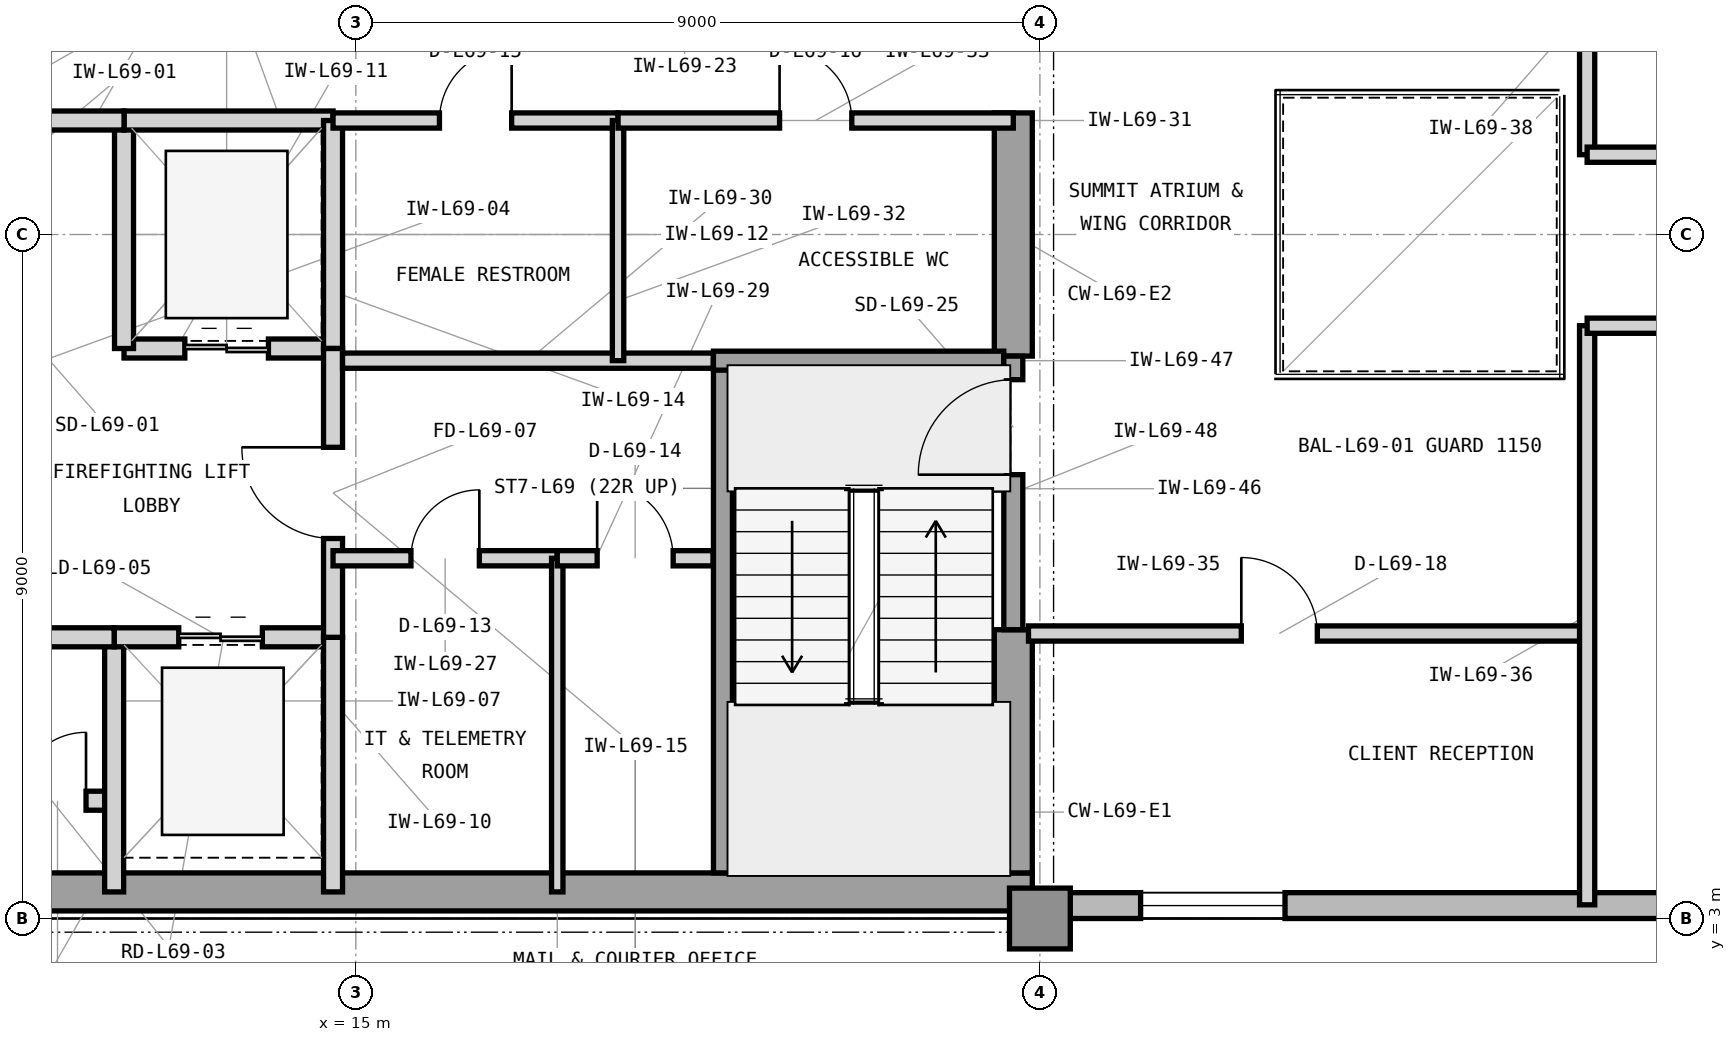
"""IFC4 building model, lengths in metres.
Left out: names, types, materials, properties, quantities, classifications, styles, units other than length and angle.
Written with IfcOpenShell. Run it as: python <this file> out.ifc"""

import sys

from ifc_helpers import new_model, si_unit, direction, frame, frame_2d, origin, origin_2d, place, context, subcontext, project, spatial, rectangle, extrude, element, fill, save


model = new_model("IFC4")
c1 = context("Model", 3, precision=1e-05, world=origin(), true_north=direction((0.0, 1.0)))
c2 = subcontext(c1, "Body", "Model", "MODEL_VIEW")
j1 = project(units=[si_unit("LENGTHUNIT", "METRE"), si_unit("PLANEANGLEUNIT", "RADIAN")], contexts=[c1])
p1 = place(None, origin())
s1 = spatial("IfcSite", under=j1, at=p1, CompositionType="ELEMENT")
p2 = place(p1, origin())
s2 = spatial("IfcBuilding", under=s1, at=p2, CompositionType="ELEMENT")
p3 = place(p2, frame((0.0, 0.0, 282.0)))
s3 = spatial("IfcBuildingStorey", under=s2, at=p3, CompositionType="ELEMENT", Elevation=282.0)
p4 = place(p3, frame((7.475, 3.35, 0.0), z_axis=(0.0, 0.0, 1.0), x_axis=(1.0, 0.0, 0.0)))
e1 = element("IfcWall", 1, at=p4, inside=s3, PredefinedType="SHEAR", context=c2, shape_type="SweptSolid", body=[
    extrude(rectangle(XDim=16.425, YDim=0.5, at=frame_2d((8.212, 0.0))), origin(), (0.0, 0.0, 1.0), 3.9),
])
p5 = place(p3, frame((23.65, 3.6, 0.0), z_axis=(0.0, 0.0, 1.0), x_axis=(0.0, 1.0, 0.0)))
e2 = element("IfcWall", 2, at=p5, inside=s3, PredefinedType="SHEAR", context=c2, shape_type="SweptSolid", body=[
    extrude(rectangle(XDim=3.2, YDim=0.5, at=frame_2d((1.6, 0.0))), origin(), (0.0, 0.0, 1.0), 3.9),
])
p6 = place(p3, frame((23.65, 10.4, 0.0), z_axis=(0.0, 0.0, 1.0), x_axis=(0.0, 1.0, 0.0)))
e3 = element("IfcWall", 3, at=p6, inside=s3, PredefinedType="SHEAR", context=c2, shape_type="SweptSolid", body=[
    extrude(rectangle(XDim=3.2, YDim=0.5, at=frame_2d((1.6, 0.0))), origin(), (0.0, 0.0, 1.0), 3.9),
])
p7 = place(p3, frame((24.0, 3.0, 0.0), z_axis=(0.0, 0.0, 1.0), x_axis=(1.0, 0.0, 0.0)))
e4 = element("IfcColumn", 4, at=p7, inside=s3, PredefinedType="COLUMN", context=c2, shape_type="SweptSolid", body=[
    extrude(rectangle(XDim=0.8, YDim=0.8, at=origin_2d()), origin(), (0.0, 0.0, 1.0), 3.9),
])
p8 = place(p3, frame((23.9, 3.17, 0.0), z_axis=(0.0, 0.0, 1.0), x_axis=(1.0, 0.0, 0.0)))
e5 = element("IfcWall", 5, at=p8, inside=s3, PredefinedType="STANDARD", context=c2, shape_type="SweptSolid", body=[
    extrude(rectangle(XDim=28.5, YDim=0.34, at=frame_2d((14.25, 0.0))), origin(), (0.0, 0.0, 1.0), 3.715),
])
p9 = place(p8, frame((1.425, 0.0, 0.8)))
e6 = element("IfcOpeningElement", 6, at=p9, cuts=e5, PredefinedType="OPENING", context=c2, shape_type="SweptSolid", body=[
    extrude(rectangle(XDim=1.9, YDim=2.35, at=frame_2d((0.95, 1.175))), frame((0.0, 0.18, 0.0), z_axis=(0.0, -1.0, 0.0), x_axis=(1.0, 0.0, 0.0)), (0.0, 0.0, 1.0), 0.36),
])
p10 = place(p8, frame((10.575, 0.0, 0.8)))
e7 = element("IfcOpeningElement", 7, at=p10, cuts=e5, PredefinedType="OPENING", context=c2, shape_type="SweptSolid", body=[
    extrude(rectangle(XDim=2.6, YDim=2.35, at=frame_2d((1.3, 1.175))), frame((0.0, 0.18, 0.0), z_axis=(0.0, -1.0, 0.0), x_axis=(1.0, 0.0, 0.0)), (0.0, 0.0, 1.0), 0.36),
])
p11 = place(p8, frame((20.075, 0.0, 0.8)))
e8 = element("IfcOpeningElement", 8, at=p11, cuts=e5, PredefinedType="OPENING", context=c2, shape_type="SweptSolid", body=[
    extrude(rectangle(XDim=2.6, YDim=2.35, at=frame_2d((1.3, 1.175))), frame((0.0, 0.18, 0.0), z_axis=(0.0, -1.0, 0.0), x_axis=(1.0, 0.0, 0.0)), (0.0, 0.0, 1.0), 0.36),
])
p12 = place(p3, frame((10.33, 4.55, 0.0), z_axis=(0.0, 0.0, 1.0), x_axis=(1.0, 0.0, 0.0)))
e9 = element("IfcWall", 9, at=p12, inside=s3, PredefinedType="PARTITIONING", context=c2, shape_type="SweptSolid", body=[
    extrude(rectangle(XDim=1.49, YDim=0.25, at=frame_2d((0.745, 0.0))), origin(), (0.0, 0.0, 1.0), 3.63),
])
p13 = place(p12, frame((0.22, 0.0, 0.0)))
e10 = element("IfcOpeningElement", 10, at=p13, cuts=e9, PredefinedType="OPENING", context=c2, shape_type="SweptSolid", body=[
    extrude(rectangle(XDim=0.9, YDim=2.1, at=frame_2d((0.45, 1.05))), frame((0.0, 0.135, 0.0), z_axis=(0.0, -1.0, 0.0), x_axis=(1.0, 0.0, 0.0)), (0.0, 0.0, 1.0), 0.27),
])
p14 = place(p3, frame((11.82, 3.35, 0.0), z_axis=(0.0, 0.0, 1.0), x_axis=(0.0, 1.0, 0.0)))
e11 = element("IfcWall", 11, at=p14, inside=s3, PredefinedType="PARTITIONING", context=c2, shape_type="SweptSolid", body=[
    extrude(rectangle(XDim=3.35, YDim=0.25, at=frame_2d((1.675, 0.0))), origin(), (0.0, 0.0, 1.0), 3.63),
])
p15 = place(p3, frame((11.82, 6.7, 0.0), z_axis=(0.0, 0.0, 1.0), x_axis=(1.0, 0.0, 0.0)))
e12 = element("IfcWall", 12, at=p15, inside=s3, PredefinedType="PARTITIONING", context=c2, shape_type="SweptSolid", body=[
    extrude(rectangle(XDim=2.88, YDim=0.25, at=frame_2d((1.44, 0.0))), origin(), (0.0, 0.0, 1.0), 3.354),
])
p16 = place(p15, frame((0.85, 0.0, 0.0)))
e13 = element("IfcOpeningElement", 13, at=p16, cuts=e12, PredefinedType="OPENING", context=c2, shape_type="SweptSolid", body=[
    extrude(rectangle(XDim=1.1, YDim=2.25, at=frame_2d((0.55, 1.125))), frame((0.0, 0.135, 0.0), z_axis=(0.0, -1.0, 0.0), x_axis=(1.0, 0.0, 0.0)), (0.0, 0.0, 1.0), 0.27),
])
p17 = place(p3, frame((14.7, 3.35, 0.0), z_axis=(0.0, 0.0, 1.0), x_axis=(0.0, 1.0, 0.0)))
e14 = element("IfcWall", 14, at=p17, inside=s3, PredefinedType="PARTITIONING", context=c2, shape_type="SweptSolid", body=[
    extrude(rectangle(XDim=3.35, YDim=0.25, at=frame_2d((1.675, 0.0))), origin(), (0.0, 0.0, 1.0), 3.63),
])
p18 = place(p3, frame((11.95, 10.5, 0.0), z_axis=(0.0, 0.0, 1.0), x_axis=(1.0, 0.0, 0.0)))
e15 = element("IfcWall", 15, at=p18, inside=s3, PredefinedType="PARTITIONING", context=c2, shape_type="SweptSolid", body=[
    extrude(rectangle(XDim=2.75, YDim=0.25, at=frame_2d((1.375, 0.0))), origin(), (0.0, 0.0, 1.0), 3.354),
])
p19 = place(p18, frame((0.8, 0.0, 0.0)))
e16 = element("IfcOpeningElement", 16, at=p19, cuts=e15, PredefinedType="OPENING", context=c2, shape_type="SweptSolid", body=[
    extrude(rectangle(XDim=1.1, YDim=2.25, at=frame_2d((0.55, 1.125))), frame((0.0, 0.135, 0.0), z_axis=(0.0, -1.0, 0.0), x_axis=(1.0, 0.0, 0.0)), (0.0, 0.0, 1.0), 0.27),
])
p20 = place(p3, frame((11.95, 10.5, 0.0), z_axis=(0.0, 0.0, 1.0), x_axis=(0.0, 1.0, 0.0)))
e17 = element("IfcWall", 17, at=p20, inside=s3, PredefinedType="PARTITIONING", context=c2, shape_type="SweptSolid", body=[
    extrude(rectangle(XDim=3.0, YDim=0.25, at=frame_2d((1.5, 0.0))), origin(), (0.0, 0.0, 1.0), 3.63),
])
p21 = place(p3, frame((11.95, 13.5, 0.0), z_axis=(0.0, 0.0, 1.0), x_axis=(1.0, 0.0, 0.0)))
e18 = element("IfcWall", 18, at=p21, inside=s3, PredefinedType="PARTITIONING", context=c2, shape_type="SweptSolid", body=[
    extrude(rectangle(XDim=2.75, YDim=0.25, at=frame_2d((1.375, 0.0))), origin(), (0.0, 0.0, 1.0), 3.354),
])
p22 = place(p3, frame((14.7, 10.5, 0.0), z_axis=(0.0, 0.0, 1.0), x_axis=(0.0, 1.0, 0.0)))
e19 = element("IfcWall", 19, at=p22, inside=s3, PredefinedType="PARTITIONING", context=c2, shape_type="SweptSolid", body=[
    extrude(rectangle(XDim=3.0, YDim=0.25, at=frame_2d((1.5, 0.0))), origin(), (0.0, 0.0, 1.0), 3.63),
])
p23 = place(p3, frame((14.7, 6.7, 0.0), z_axis=(0.0, 0.0, 1.0), x_axis=(0.0, 1.0, 0.0)))
e20 = element("IfcWall", 20, at=p23, inside=s3, PredefinedType="PARTITIONING", context=c2, shape_type="SweptSolid", body=[
    extrude(rectangle(XDim=3.8, YDim=0.25, at=frame_2d((1.9, 0.0))), origin(), (0.0, 0.0, 1.0), 3.63),
])
p24 = place(p23, frame((1.3, 0.0, 0.0)))
e21 = element("IfcOpeningElement", 21, at=p24, cuts=e20, PredefinedType="OPENING", context=c2, shape_type="SweptSolid", body=[
    extrude(rectangle(XDim=1.2, YDim=2.2, at=frame_2d((0.6, 1.1))), frame((0.0, 0.135, 0.0), z_axis=(0.0, -1.0, 0.0), x_axis=(1.0, 0.0, 0.0)), (0.0, 0.0, 1.0), 0.27),
])
p25 = place(p3, frame((10.33, 13.5, 0.0), z_axis=(0.0, 0.0, 1.0), x_axis=(1.0, 0.0, 0.0)))
e22 = element("IfcWall", 22, at=p25, inside=s3, PredefinedType="PARTITIONING", context=c2, shape_type="SweptSolid", body=[
    extrude(rectangle(XDim=1.62, YDim=0.25, at=frame_2d((0.81, 0.0))), origin(), (0.0, 0.0, 1.0), 3.354),
])
p26 = place(p3, frame((10.33, 6.7, 0.0), z_axis=(0.0, 0.0, 1.0), x_axis=(1.0, 0.0, 0.0)))
e23 = element("IfcWall", 23, at=p26, inside=s3, PredefinedType="PARTITIONING", context=c2, shape_type="SweptSolid", body=[
    extrude(rectangle(XDim=1.49, YDim=0.25, at=frame_2d((0.745, 0.0))), origin(), (0.0, 0.0, 1.0), 3.354),
])
p27 = place(p3, frame((14.7, 7.74, 0.0), z_axis=(0.0, 0.0, 1.0), x_axis=(1.0, 0.0, 0.0)))
e24 = element("IfcWall", 24, at=p27, inside=s3, PredefinedType="PARTITIONING", context=c2, shape_type="SweptSolid", body=[
    extrude(rectangle(XDim=2.95, YDim=0.2, at=frame_2d((1.475, 0.0))), origin(), (0.0, 0.0, 1.0), 3.63),
])
p28 = place(p27, frame((1.025, 0.0, 0.0)))
e25 = element("IfcOpeningElement", 25, at=p28, cuts=e24, PredefinedType="OPENING", context=c2, shape_type="SweptSolid", body=[
    extrude(rectangle(XDim=0.9, YDim=2.1, at=frame_2d((0.45, 1.05))), frame((0.0, 0.11, 0.0), z_axis=(0.0, -1.0, 0.0), x_axis=(1.0, 0.0, 0.0)), (0.0, 0.0, 1.0), 0.22),
])
p29 = place(p3, frame((17.65, 3.35, 0.0), z_axis=(0.0, 0.0, 1.0), x_axis=(0.0, 1.0, 0.0)))
e26 = element("IfcWall", 26, at=p29, inside=s3, PredefinedType="PARTITIONING", context=c2, shape_type="SweptSolid", body=[
    extrude(rectangle(XDim=4.39, YDim=0.15, at=frame_2d((2.195, 0.0))), origin(), (0.0, 0.0, 1.0), 3.63),
])
p30 = place(p3, frame((17.65, 7.74, 0.0), z_axis=(0.0, 0.0, 1.0), x_axis=(1.0, 0.0, 0.0)))
e27 = element("IfcWall", 27, at=p30, inside=s3, PredefinedType="PARTITIONING", context=c2, shape_type="SweptSolid", body=[
    extrude(rectangle(XDim=2.05, YDim=0.2, at=frame_2d((1.025, 0.0))), origin(), (0.0, 0.0, 1.0), 3.63),
])
p31 = place(p30, frame((0.525, 0.0, 0.0)))
e28 = element("IfcOpeningElement", 28, at=p31, cuts=e27, PredefinedType="OPENING", context=c2, shape_type="SweptSolid", body=[
    extrude(rectangle(XDim=1.0, YDim=2.15, at=frame_2d((0.5, 1.075))), frame((0.0, 0.11, 0.0), z_axis=(0.0, -1.0, 0.0), x_axis=(1.0, 0.0, 0.0)), (0.0, 0.0, 1.0), 0.22),
])
p32 = place(p3, frame((14.825, 10.34, 0.0), z_axis=(0.0, 0.0, 1.0), x_axis=(1.0, 0.0, 0.0)))
e29 = element("IfcWall", 29, at=p32, inside=s3, PredefinedType="PARTITIONING", context=c2, shape_type="SweptSolid", body=[
    extrude(rectangle(XDim=4.88, YDim=0.2, at=frame_2d((2.44, 0.0))), origin(), (0.0, 0.0, 1.0), 3.63),
])
p33 = place(p3, frame((14.7, 13.5, 0.0), z_axis=(0.0, 0.0, 1.0), x_axis=(1.0, 0.0, 0.0)))
e30 = element("IfcWall", 30, at=p33, inside=s3, PredefinedType="PARTITIONING", context=c2, shape_type="SweptSolid", body=[
    extrude(rectangle(XDim=3.75, YDim=0.2, at=frame_2d((1.875, 0.0))), origin(), (0.0, 0.0, 1.0), 3.354),
])
p34 = place(p33, frame((1.4, 0.0, 0.0)))
e31 = element("IfcOpeningElement", 31, at=p34, cuts=e30, PredefinedType="OPENING", context=c2, shape_type="SweptSolid", body=[
    extrude(rectangle(XDim=0.95, YDim=2.1, at=frame_2d((0.475, 1.05))), frame((0.0, 0.11, 0.0), z_axis=(0.0, -1.0, 0.0), x_axis=(1.0, 0.0, 0.0)), (0.0, 0.0, 1.0), 0.22),
])
p35 = place(p3, frame((18.45, 10.34, 0.0), z_axis=(0.0, 0.0, 1.0), x_axis=(0.0, 1.0, 0.0)))
e32 = element("IfcWall", 32, at=p35, inside=s3, PredefinedType="PARTITIONING", context=c2, shape_type="SweptSolid", body=[
    extrude(rectangle(XDim=3.16, YDim=0.15, at=frame_2d((1.58, 0.0))), origin(), (0.0, 0.0, 1.0), 3.63),
])
p36 = place(p3, frame((18.45, 13.5, 0.0), z_axis=(0.0, 0.0, 1.0), x_axis=(1.0, 0.0, 0.0)))
e33 = element("IfcWall", 33, at=p36, inside=s3, PredefinedType="PARTITIONING", context=c2, shape_type="SweptSolid", body=[
    extrude(rectangle(XDim=5.2, YDim=0.2, at=frame_2d((2.6, 0.0))), origin(), (0.0, 0.0, 1.0), 3.354),
])
p37 = place(p36, frame((2.125, 0.0, 0.0)))
e34 = element("IfcOpeningElement", 34, at=p37, cuts=e33, PredefinedType="OPENING", context=c2, shape_type="SweptSolid", body=[
    extrude(rectangle(XDim=0.95, YDim=2.1, at=frame_2d((0.475, 1.05))), frame((0.0, 0.11, 0.0), z_axis=(0.0, -1.0, 0.0), x_axis=(1.0, 0.0, 0.0)), (0.0, 0.0, 1.0), 0.22),
])
p38 = place(p3, frame((23.85, 6.75, 0.0), z_axis=(0.0, 0.0, 1.0), x_axis=(1.0, 0.0, 0.0)))
e35 = element("IfcWall", 35, at=p38, inside=s3, PredefinedType="PARTITIONING", context=c2, shape_type="SweptSolid", body=[
    extrude(rectangle(XDim=7.35, YDim=0.2, at=frame_2d((3.675, 0.0))), origin(), (0.0, 0.0, 1.0), 3.63),
])
p39 = place(p38, frame((2.8, 0.0, 0.0)))
e36 = element("IfcOpeningElement", 36, at=p39, cuts=e35, PredefinedType="OPENING", context=c2, shape_type="SweptSolid", body=[
    extrude(rectangle(XDim=1.0, YDim=2.15, at=frame_2d((0.5, 1.075))), frame((0.0, 0.11, 0.0), z_axis=(0.0, -1.0, 0.0), x_axis=(1.0, 0.0, 0.0)), (0.0, 0.0, 1.0), 0.22),
])
p40 = place(p3, frame((31.2, 3.18, 0.0), z_axis=(0.0, 0.0, 1.0), x_axis=(0.0, 1.0, 0.0)))
e37 = element("IfcWall", 37, at=p40, inside=s3, PredefinedType="PARTITIONING", context=c2, shape_type="SweptSolid", body=[
    extrude(rectangle(XDim=7.62, YDim=0.2, at=frame_2d((3.81, 0.0))), origin(), (0.0, 0.0, 1.0), 3.63),
])
p41 = place(p3, frame((31.2, 13.05, 0.0), z_axis=(0.0, 0.0, 1.0), x_axis=(0.0, 1.0, 0.0)))
e38 = element("IfcWall", 38, at=p41, inside=s3, PredefinedType="PARTITIONING", context=c2, shape_type="SweptSolid", body=[
    extrude(rectangle(XDim=7.77, YDim=0.2, at=frame_2d((3.885, 0.0))), origin(), (0.0, 0.0, 1.0), 3.63),
])
p42 = place(p3, frame((31.2, 10.8, 0.0), z_axis=(0.0, 0.0, 1.0), x_axis=(1.0, 0.0, 0.0)))
e39 = element("IfcWall", 39, at=p42, inside=s3, PredefinedType="PARTITIONING", context=c2, shape_type="SweptSolid", body=[
    extrude(rectangle(XDim=7.5, YDim=0.2, at=frame_2d((3.75, 0.0))), origin(), (0.0, 0.0, 1.0), 3.63),
])
p43 = place(p42, frame((3.25, 0.0, 0.0)))
e40 = element("IfcOpeningElement", 40, at=p43, cuts=e39, PredefinedType="OPENING", context=c2, shape_type="SweptSolid", body=[
    extrude(rectangle(XDim=1.0, YDim=2.15, at=frame_2d((0.5, 1.075))), frame((0.0, 0.11, 0.0), z_axis=(0.0, -1.0, 0.0), x_axis=(1.0, 0.0, 0.0)), (0.0, 0.0, 1.0), 0.22),
])
p44 = place(p3, frame((31.2, 13.05, 0.0), z_axis=(0.0, 0.0, 1.0), x_axis=(1.0, 0.0, 0.0)))
e41 = element("IfcWall", 41, at=p44, inside=s3, PredefinedType="PARTITIONING", context=c2, shape_type="SweptSolid", body=[
    extrude(rectangle(XDim=9.5, YDim=0.2, at=frame_2d((4.75, 0.0))), origin(), (0.0, 0.0, 1.0), 3.63),
])
p45 = place(p44, frame((4.25, 0.0, 0.0)))
e42 = element("IfcOpeningElement", 42, at=p45, cuts=e41, PredefinedType="OPENING", context=c2, shape_type="SweptSolid", body=[
    extrude(rectangle(XDim=1.0, YDim=2.15, at=frame_2d((0.5, 1.075))), frame((0.0, 0.11, 0.0), z_axis=(0.0, -1.0, 0.0), x_axis=(1.0, 0.0, 0.0)), (0.0, 0.0, 1.0), 0.22),
])
p46 = place(p3, frame((19.83, 3.6, 0.0), z_axis=(0.0, 0.0, 1.0), x_axis=(0.0, 1.0, 0.0)))
e43 = element("IfcWall", 43, at=p46, inside=s3, PredefinedType="SHEAR", context=c2, shape_type="SweptSolid", body=[
    extrude(rectangle(XDim=6.74, YDim=0.25, at=frame_2d((3.37, 0.0))), origin(), (0.0, 0.0, 1.0), 3.9),
])
p47 = place(p3, frame((19.705, 10.34, 0.0), z_axis=(0.0, 0.0, 1.0), x_axis=(1.0, 0.0, 0.0)))
e44 = element("IfcWall", 44, at=p47, inside=s3, PredefinedType="SHEAR", context=c2, shape_type="SweptSolid", body=[
    extrude(rectangle(XDim=3.82, YDim=0.25, at=frame_2d((1.91, 0.0))), origin(), (0.0, 0.0, 1.0), 3.9),
])
p48 = place(p3, frame((23.65, 6.8, 0.0), z_axis=(0.0, 0.0, 1.0), x_axis=(0.0, 1.0, 0.0)))
e45 = element("IfcWall", 45, at=p48, inside=s3, PredefinedType="SHEAR", context=c2, shape_type="SweptSolid", body=[
    extrude(rectangle(XDim=3.6, YDim=0.25, at=frame_2d((1.8, 0.0))), origin(), (0.0, 0.0, 1.0), 3.9),
])
p49 = place(p48, frame((2.04, 0.0, 0.0)))
e46 = element("IfcOpeningElement", 46, at=p49, cuts=e45, PredefinedType="OPENING", context=c2, shape_type="SweptSolid", body=[
    extrude(rectangle(XDim=1.25, YDim=2.2, at=frame_2d((0.625, 1.1))), frame((0.0, 0.135, 0.0), z_axis=(0.0, -1.0, 0.0), x_axis=(1.0, 0.0, 0.0)), (0.0, 0.0, 1.0), 0.27),
])
p50 = place(p9, origin())
e47 = element("IfcWindow", 47, at=p50, inside=s3, PartitioningType="SINGLE_PANEL", PredefinedType="WINDOW", context=c2, shape_type="SweptSolid", body=[
    extrude(rectangle(XDim=1.9, YDim=2.35, at=frame_2d((0.95, 1.175))), frame((0.0, 0.11, 0.0), z_axis=(0.0, -1.0, 0.0), x_axis=(1.0, 0.0, 0.0)), (0.0, 0.0, 1.0), 0.06),
])
fill(e6, e47)
p51 = place(p13, origin())
e48 = element("IfcDoor", 48, at=p51, inside=s3, OperationType="SINGLE_SWING_RIGHT", PredefinedType="TRAPDOOR", context=c2, shape_type="SweptSolid", body=[
    extrude(rectangle(XDim=0.9, YDim=2.1, at=frame_2d((0.45, 1.05))), frame((0.0, 0.025, 0.0), z_axis=(0.0, -1.0, 0.0), x_axis=(1.0, 0.0, 0.0)), (0.0, 0.0, 1.0), 0.05),
])
fill(e10, e48)
p52 = place(p16, origin())
e49 = element("IfcDoor", 49, at=p52, inside=s3, OperationType="DOUBLE_DOOR_SLIDING", PredefinedType="DOOR", context=c2, shape_type="SweptSolid", body=[
    extrude(rectangle(XDim=1.1, YDim=2.25, at=frame_2d((0.55, 1.125))), frame((0.0, 0.025, 0.0), z_axis=(0.0, -1.0, 0.0), x_axis=(1.0, 0.0, 0.0)), (0.0, 0.0, 1.0), 0.05),
])
fill(e13, e49)
p53 = place(p19, origin())
e50 = element("IfcDoor", 50, at=p53, inside=s3, OperationType="DOUBLE_DOOR_SLIDING", PredefinedType="DOOR", context=c2, shape_type="SweptSolid", body=[
    extrude(rectangle(XDim=1.1, YDim=2.25, at=frame_2d((0.55, 1.125))), frame((0.0, 0.025, 0.0), z_axis=(0.0, -1.0, 0.0), x_axis=(1.0, 0.0, 0.0)), (0.0, 0.0, 1.0), 0.05),
])
fill(e16, e50)
p54 = place(p24, origin())
e51 = element("IfcDoor", 51, at=p54, inside=s3, OperationType="SINGLE_SWING_RIGHT", PredefinedType="DOOR", context=c2, shape_type="SweptSolid", body=[
    extrude(rectangle(XDim=1.2, YDim=2.2, at=frame_2d((0.6, 1.1))), frame((0.0, 0.025, 0.0), z_axis=(0.0, -1.0, 0.0), x_axis=(1.0, 0.0, 0.0)), (0.0, 0.0, 1.0), 0.05),
])
fill(e21, e51)
p55 = place(p28, origin())
e52 = element("IfcDoor", 52, at=p55, inside=s3, OperationType="SINGLE_SWING_RIGHT", PredefinedType="TRAPDOOR", context=c2, shape_type="SweptSolid", body=[
    extrude(rectangle(XDim=0.9, YDim=2.1, at=frame_2d((0.45, 1.05))), frame((0.0, 0.025, 0.0), z_axis=(0.0, -1.0, 0.0), x_axis=(1.0, 0.0, 0.0)), (0.0, 0.0, 1.0), 0.05),
])
fill(e25, e52)
p56 = place(p31, origin())
e53 = element("IfcDoor", 53, at=p56, inside=s3, OperationType="SINGLE_SWING_LEFT", PredefinedType="DOOR", context=c2, shape_type="SweptSolid", body=[
    extrude(rectangle(XDim=1.0, YDim=2.15, at=frame_2d((0.5, 1.075))), frame((0.0, 0.025, 0.0), z_axis=(0.0, -1.0, 0.0), x_axis=(1.0, 0.0, 0.0)), (0.0, 0.0, 1.0), 0.05),
])
fill(e28, e53)
p57 = place(p34, origin())
e54 = element("IfcDoor", 54, at=p57, inside=s3, OperationType="SINGLE_SWING_RIGHT", PredefinedType="DOOR", context=c2, shape_type="SweptSolid", body=[
    extrude(rectangle(XDim=0.95, YDim=2.1, at=frame_2d((0.475, 1.05))), frame((0.0, 0.025, 0.0), z_axis=(0.0, -1.0, 0.0), x_axis=(1.0, 0.0, 0.0)), (0.0, 0.0, 1.0), 0.05),
])
fill(e31, e54)
p58 = place(p37, origin())
e55 = element("IfcDoor", 55, at=p58, inside=s3, OperationType="SINGLE_SWING_LEFT", PredefinedType="DOOR", context=c2, shape_type="SweptSolid", body=[
    extrude(rectangle(XDim=0.95, YDim=2.1, at=frame_2d((0.475, 1.05))), frame((0.0, 0.025, 0.0), z_axis=(0.0, -1.0, 0.0), x_axis=(1.0, 0.0, 0.0)), (0.0, 0.0, 1.0), 0.05),
])
fill(e34, e55)
p59 = place(p39, origin())
e56 = element("IfcDoor", 56, at=p59, inside=s3, OperationType="SINGLE_SWING_LEFT", PredefinedType="DOOR", context=c2, shape_type="SweptSolid", body=[
    extrude(rectangle(XDim=1.0, YDim=2.15, at=frame_2d((0.5, 1.075))), frame((0.0, 0.025, 0.0), z_axis=(0.0, -1.0, 0.0), x_axis=(1.0, 0.0, 0.0)), (0.0, 0.0, 1.0), 0.05),
])
fill(e36, e56)
p60 = place(p49, origin())
e57 = element("IfcDoor", 57, at=p60, inside=s3, OperationType="SINGLE_SWING_LEFT", PredefinedType="DOOR", context=c2, shape_type="SweptSolid", body=[
    extrude(rectangle(XDim=1.25, YDim=2.2, at=frame_2d((0.625, 1.1))), frame((0.0, 0.025, 0.0), z_axis=(0.0, -1.0, 0.0), x_axis=(1.0, 0.0, 0.0)), (0.0, 0.0, 1.0), 0.05),
])
fill(e46, e57)
save(model, sys.argv[1])
